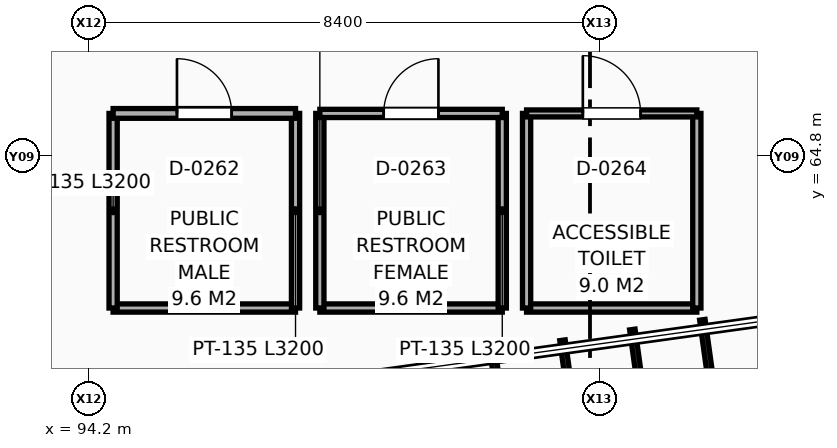
"""IFC4 building model, lengths in metres.
Left out: names, types, materials, properties, quantities, classifications, styles, units other than length and angle.
Written with IfcOpenShell. Run it as: python <this file> out.ifc"""

import sys

from ifc_helpers import new_model, si_unit, direction, frame, frame_2d, origin, place, context, subcontext, project, spatial, rectangle, extrude, element, fill, save


model = new_model("IFC4")
c1 = context("Model", 3, precision=1e-05, world=origin(), true_north=direction((0.0, 1.0)))
c2 = subcontext(c1, "Body", "Model", "MODEL_VIEW")
j1 = project(units=[si_unit("LENGTHUNIT", "METRE"), si_unit("PLANEANGLEUNIT", "RADIAN")], contexts=[c1])
p1 = place(None, origin())
s1 = spatial("IfcSite", under=j1, at=p1, CompositionType="ELEMENT")
p2 = place(p1, origin())
s2 = spatial("IfcBuilding", under=s1, at=p2, CompositionType="ELEMENT")
p3 = place(p2, frame((0.0, 0.0, 22.2)))
s3 = spatial("IfcBuildingStorey", under=s2, at=p3, CompositionType="ELEMENT", Elevation=22.2)
p4 = place(p3, frame((94.6, 62.3, 0.0), z_axis=(0.0, 0.0, 1.0), x_axis=(1.0, 0.0, 0.0)))
e1 = element("IfcWall", 1, at=p4, inside=s3, PredefinedType="PARTITIONING", context=c2, shape_type="SweptSolid", body=[
    extrude(rectangle(XDim=3.0, YDim=0.135, at=frame_2d((1.5, 0.0))), origin(), (0.0, 0.0, 1.0), 3.86),
])
for number, where, z_axis, x_axis in (
    (2, (97.6, 62.3, 0.0), (0.0, 0.0, 1.0), (0.0, 1.0, 0.0)),
    (3, (94.6, 62.3, 0.0), (0.0, 0.0, 1.0), (0.0, 1.0, 0.0)),
):
    element("IfcWall", number, at=place(p3, frame(where, z_axis=z_axis, x_axis=x_axis)), inside=s3, PredefinedType="PARTITIONING", context=c2, shape_type="SweptSolid", body=[
        extrude(rectangle(XDim=3.2, YDim=0.135, at=frame_2d((1.6, 0.0))), origin(), (0.0, 0.0, 1.0), 3.86),
    ])
p5 = place(p3, frame((94.6, 65.5, 0.0), z_axis=(0.0, 0.0, 1.0), x_axis=(1.0, 0.0, 0.0)))
e4 = element("IfcWall", 4, at=p5, inside=s3, PredefinedType="PARTITIONING", context=c2, shape_type="SweptSolid", body=[
    extrude(rectangle(XDim=3.0, YDim=0.16, at=frame_2d((1.5, 0.0))), origin(), (0.0, 0.0, 1.0), 3.86),
])
p6 = place(p5, frame((1.05, 0.0, 0.0)))
e5 = element("IfcOpeningElement", 5, at=p6, cuts=e4, PredefinedType="OPENING", context=c2, shape_type="SweptSolid", body=[
    extrude(rectangle(XDim=0.9, YDim=2.1, at=frame_2d((0.45, 1.05))), frame((0.0, 0.09, 0.0), z_axis=(0.0, -1.0, 0.0), x_axis=(1.0, 0.0, 0.0)), (0.0, 0.0, 1.0), 0.18),
])
p7 = place(p3, frame((98.0, 62.3, 0.0), z_axis=(0.0, 0.0, 1.0), x_axis=(1.0, 0.0, 0.0)))
e6 = element("IfcWall", 6, at=p7, inside=s3, PredefinedType="PARTITIONING", context=c2, shape_type="SweptSolid", body=[
    extrude(rectangle(XDim=3.0, YDim=0.135, at=frame_2d((1.5, 0.0))), origin(), (0.0, 0.0, 1.0), 3.86),
])
for number, where, z_axis, x_axis in (
    (7, (101.0, 62.3, 0.0), (0.0, 0.0, 1.0), (0.0, 1.0, 0.0)),
    (8, (98.0, 62.3, 0.0), (0.0, 0.0, 1.0), (0.0, 1.0, 0.0)),
):
    element("IfcWall", number, at=place(p3, frame(where, z_axis=z_axis, x_axis=x_axis)), inside=s3, PredefinedType="PARTITIONING", context=c2, shape_type="SweptSolid", body=[
        extrude(rectangle(XDim=3.2, YDim=0.135, at=frame_2d((1.6, 0.0))), origin(), (0.0, 0.0, 1.0), 3.86),
    ])
p8 = place(p3, frame((98.0, 65.5, 0.0), z_axis=(0.0, 0.0, 1.0), x_axis=(1.0, 0.0, 0.0)))
e9 = element("IfcWall", 9, at=p8, inside=s3, PredefinedType="PARTITIONING", context=c2, shape_type="SweptSolid", body=[
    extrude(rectangle(XDim=3.0, YDim=0.135, at=frame_2d((1.5, 0.0))), origin(), (0.0, 0.0, 1.0), 3.86),
])
p9 = place(p8, frame((1.05, 0.0, 0.0)))
e10 = element("IfcOpeningElement", 10, at=p9, cuts=e9, PredefinedType="OPENING", context=c2, shape_type="SweptSolid", body=[
    extrude(rectangle(XDim=0.9, YDim=2.1, at=frame_2d((0.45, 1.05))), frame((0.0, 0.077, 0.0), z_axis=(0.0, -1.0, 0.0), x_axis=(1.0, 0.0, 0.0)), (0.0, 0.0, 1.0), 0.155),
])
p10 = place(p3, frame((101.4, 62.3, 0.0), z_axis=(0.0, 0.0, 1.0), x_axis=(1.0, 0.0, 0.0)))
e11 = element("IfcWall", 11, at=p10, inside=s3, PredefinedType="PARTITIONING", context=c2, shape_type="SweptSolid", body=[
    extrude(rectangle(XDim=2.8, YDim=0.135, at=frame_2d((1.4, 0.0))), origin(), (0.0, 0.0, 1.0), 3.86),
])
for number, where, z_axis, x_axis in (
    (12, (104.2, 62.3, 0.0), (0.0, 0.0, 1.0), (0.0, 1.0, 0.0)),
    (13, (101.4, 62.3, 0.0), (0.0, 0.0, 1.0), (0.0, 1.0, 0.0)),
):
    element("IfcWall", number, at=place(p3, frame(where, z_axis=z_axis, x_axis=x_axis)), inside=s3, PredefinedType="PARTITIONING", context=c2, shape_type="SweptSolid", body=[
        extrude(rectangle(XDim=3.2, YDim=0.135, at=frame_2d((1.6, 0.0))), origin(), (0.0, 0.0, 1.0), 3.86),
    ])
p11 = place(p3, frame((101.4, 65.5, 0.0), z_axis=(0.0, 0.0, 1.0), x_axis=(1.0, 0.0, 0.0)))
e14 = element("IfcWall", 14, at=p11, inside=s3, PredefinedType="PARTITIONING", context=c2, shape_type="SweptSolid", body=[
    extrude(rectangle(XDim=2.8, YDim=0.115, at=frame_2d((1.4, 0.0))), origin(), (0.0, 0.0, 1.0), 3.664),
])
p12 = place(p11, frame((0.925, 0.0, 0.0)))
e15 = element("IfcOpeningElement", 15, at=p12, cuts=e14, PredefinedType="OPENING", context=c2, shape_type="SweptSolid", body=[
    extrude(rectangle(XDim=0.95, YDim=2.1, at=frame_2d((0.475, 1.05))), frame((0.0, 0.067, 0.0), z_axis=(0.0, -1.0, 0.0), x_axis=(1.0, 0.0, 0.0)), (0.0, 0.0, 1.0), 0.135),
])
p13 = place(p6, origin())
e16 = element("IfcDoor", 16, at=p13, inside=s3, OperationType="SINGLE_SWING_LEFT", PredefinedType="DOOR", context=c2, shape_type="SweptSolid", body=[
    extrude(rectangle(XDim=0.9, YDim=2.1, at=frame_2d((0.45, 1.05))), frame((0.0, 0.025, 0.0), z_axis=(0.0, -1.0, 0.0), x_axis=(1.0, 0.0, 0.0)), (0.0, 0.0, 1.0), 0.05),
])
fill(e5, e16)
p14 = place(p9, origin())
e17 = element("IfcDoor", 17, at=p14, inside=s3, OperationType="SINGLE_SWING_RIGHT", PredefinedType="DOOR", context=c2, shape_type="SweptSolid", body=[
    extrude(rectangle(XDim=0.9, YDim=2.1, at=frame_2d((0.45, 1.05))), frame((0.0, 0.025, 0.0), z_axis=(0.0, -1.0, 0.0), x_axis=(1.0, 0.0, 0.0)), (0.0, 0.0, 1.0), 0.05),
])
fill(e10, e17)
p15 = place(p12, origin())
e18 = element("IfcDoor", 18, at=p15, inside=s3, OperationType="SINGLE_SWING_LEFT", PredefinedType="DOOR", context=c2, shape_type="SweptSolid", body=[
    extrude(rectangle(XDim=0.95, YDim=2.1, at=frame_2d((0.475, 1.05))), frame((0.0, 0.025, 0.0), z_axis=(0.0, -1.0, 0.0), x_axis=(1.0, 0.0, 0.0)), (0.0, 0.0, 1.0), 0.05),
])
fill(e15, e18)
save(model, sys.argv[1])
